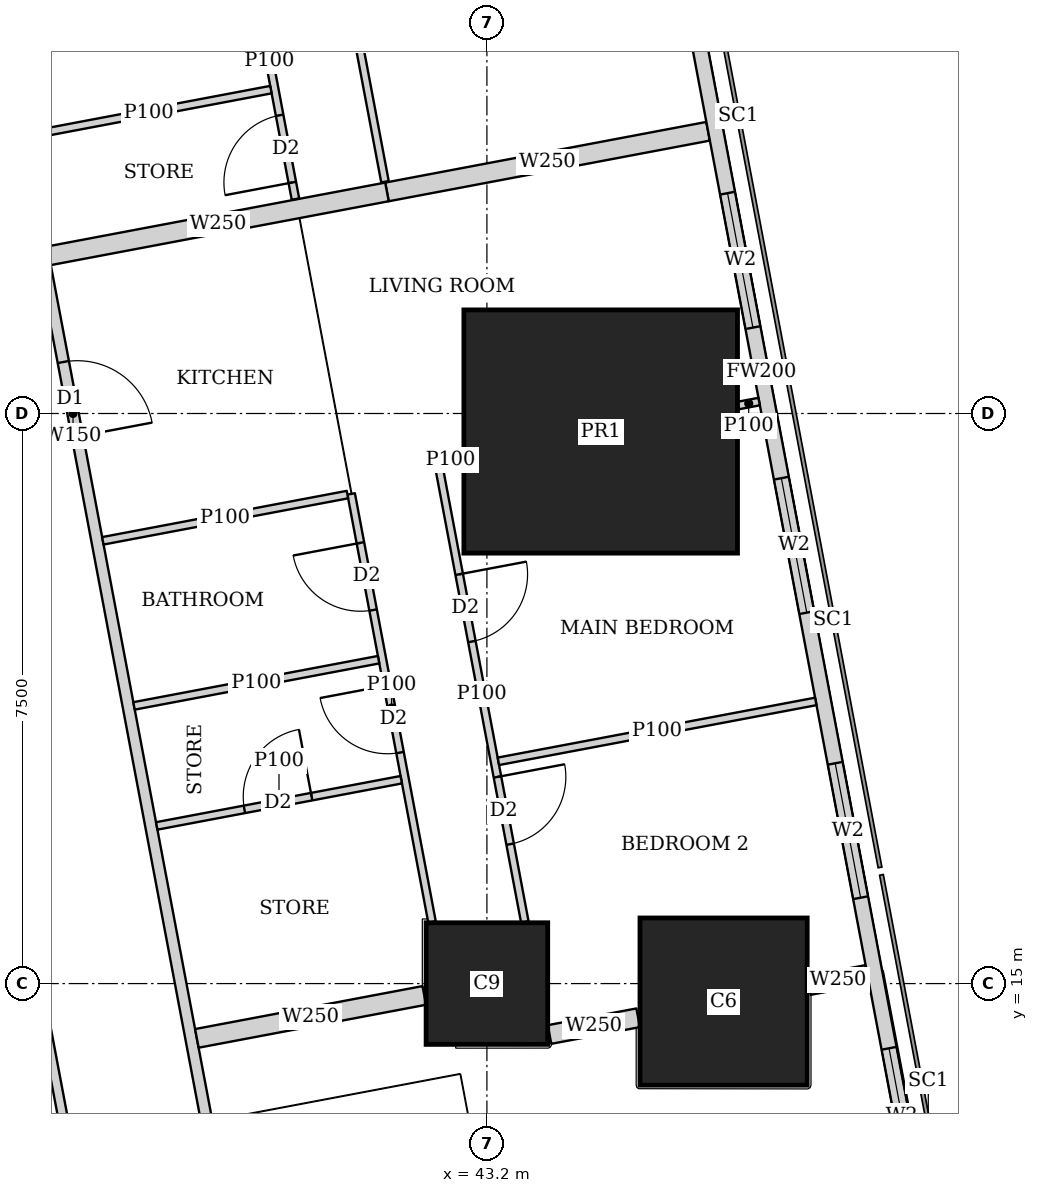
"""IFC4 building model, lengths in metres.
Left out: names, types, materials, properties, quantities, classifications, styles, units other than length and angle.
Written with IfcOpenShell. Run it as: python <this file> out.ifc"""

import sys

from ifc_helpers import new_model, si_unit, direction, frame, frame_2d, origin, origin_2d, place, context, subcontext, project, spatial, rectangle, extrude, element, fill, save


model = new_model("IFC4")
c1 = context("Model", 3, precision=1e-05, world=origin(), true_north=direction((0.0, 1.0)))
c2 = subcontext(c1, "Body", "Model", "MODEL_VIEW")
j1 = project(units=[si_unit("LENGTHUNIT", "METRE"), si_unit("PLANEANGLEUNIT", "RADIAN")], contexts=[c1])
p1 = place(None, origin())
s1 = spatial("IfcSite", under=j1, at=p1, CompositionType="ELEMENT")
p2 = place(p1, origin())
s2 = spatial("IfcBuilding", under=s1, at=p2, CompositionType="ELEMENT")
p3 = place(p2, frame((0.0, 0.0, 122.9)))
s3 = spatial("IfcBuildingStorey", under=s2, at=p3, CompositionType="ELEMENT", Elevation=122.9)
p4 = place(p3, frame((43.2, 15.0, 0.0), z_axis=(0.0, 0.0, 1.0), x_axis=(1.0, 0.0, 0.0)))
e1 = element("IfcColumn", 1, at=p4, inside=s3, PredefinedType="COLUMN", context=c2, shape_type="SweptSolid", body=[
    extrude(rectangle(XDim=1.6, YDim=1.6, at=origin_2d()), origin(), (0.0, 0.0, 1.0), 3.75),
])
p5 = place(p3, frame((46.314, 14.763, 0.0), z_axis=(0.0, 0.0, 1.0), x_axis=(1.0, 0.0, 0.0)))
e2 = element("IfcColumn", 2, at=p5, inside=s3, PredefinedType="COLUMN", context=c2, shape_type="SweptSolid", body=[
    extrude(rectangle(XDim=2.2, YDim=2.2, at=origin_2d()), origin(), (0.0, 0.0, 1.0), 3.75),
])
p6 = place(p3, frame((44.697, 22.263, 0.0), z_axis=(0.0, 0.0, 1.0), x_axis=(1.0, 0.0, 0.0)))
e3 = element("IfcColumn", 3, at=p6, inside=s3, PredefinedType="COLUMN", context=c2, shape_type="SweptSolid", body=[
    extrude(rectangle(XDim=3.6, YDim=3.2, at=origin_2d()), origin(), (0.0, 0.0, 1.0), 3.75),
])
p7 = place(p3, frame((50.653, 2.703, 0.0), z_axis=(0.0, 0.0, 1.0), x_axis=(-0.185612026696, 0.982623109613, 0.0)))
e4 = element("IfcWall", 4, at=p7, inside=s3, PredefinedType="SOLIDWALL", context=c2, shape_type="SweptSolid", body=[
    extrude(rectangle(XDim=41.393, YDim=0.2, at=frame_2d((20.697, 0.0))), origin(), (0.0, 0.0, 1.0), 3.5),
])
p8 = place(p7, frame((1.633, 0.0, 0.9)))
e5 = element("IfcOpeningElement", 5, at=p8, cuts=e4, PredefinedType="OPENING", context=c2, shape_type="SweptSolid", body=[
    extrude(rectangle(XDim=1.8, YDim=1.5, at=frame_2d((0.9, 0.75))), frame((0.0, 0.11, 0.0), z_axis=(0.0, -1.0, 0.0), x_axis=(1.0, 0.0, 0.0)), (0.0, 0.0, 1.0), 0.22),
])
p9 = place(p7, frame((6.032, 0.0, 0.9)))
e6 = element("IfcOpeningElement", 6, at=p9, cuts=e4, PredefinedType="OPENING", context=c2, shape_type="SweptSolid", body=[
    extrude(rectangle(XDim=1.8, YDim=1.5, at=frame_2d((0.9, 0.75))), frame((0.0, 0.11, 0.0), z_axis=(0.0, -1.0, 0.0), x_axis=(1.0, 0.0, 0.0)), (0.0, 0.0, 1.0), 0.22),
])
p10 = place(p7, frame((9.848, 0.0, 0.9)))
e7 = element("IfcOpeningElement", 7, at=p10, cuts=e4, PredefinedType="OPENING", context=c2, shape_type="SweptSolid", body=[
    extrude(rectangle(XDim=1.8, YDim=1.5, at=frame_2d((0.9, 0.75))), frame((0.0, 0.11, 0.0), z_axis=(0.0, -1.0, 0.0), x_axis=(1.0, 0.0, 0.0)), (0.0, 0.0, 1.0), 0.22),
])
p11 = place(p7, frame((13.664, 0.0, 0.9)))
e8 = element("IfcOpeningElement", 8, at=p11, cuts=e4, PredefinedType="OPENING", context=c2, shape_type="SweptSolid", body=[
    extrude(rectangle(XDim=1.8, YDim=1.5, at=frame_2d((0.9, 0.75))), frame((0.0, 0.11, 0.0), z_axis=(0.0, -1.0, 0.0), x_axis=(1.0, 0.0, 0.0)), (0.0, 0.0, 1.0), 0.22),
])
p12 = place(p7, frame((17.481, 0.0, 0.9)))
e9 = element("IfcOpeningElement", 9, at=p12, cuts=e4, PredefinedType="OPENING", context=c2, shape_type="SweptSolid", body=[
    extrude(rectangle(XDim=1.8, YDim=1.5, at=frame_2d((0.9, 0.75))), frame((0.0, 0.11, 0.0), z_axis=(0.0, -1.0, 0.0), x_axis=(1.0, 0.0, 0.0)), (0.0, 0.0, 1.0), 0.22),
])
p13 = place(p7, frame((21.297, 0.0, 0.9)))
e10 = element("IfcOpeningElement", 10, at=p13, cuts=e4, PredefinedType="OPENING", context=c2, shape_type="SweptSolid", body=[
    extrude(rectangle(XDim=1.8, YDim=1.5, at=frame_2d((0.9, 0.75))), frame((0.0, 0.11, 0.0), z_axis=(0.0, -1.0, 0.0), x_axis=(1.0, 0.0, 0.0)), (0.0, 0.0, 1.0), 0.22),
])
p14 = place(p7, frame((25.113, 0.0, 0.9)))
e11 = element("IfcOpeningElement", 11, at=p14, cuts=e4, PredefinedType="OPENING", context=c2, shape_type="SweptSolid", body=[
    extrude(rectangle(XDim=1.8, YDim=1.5, at=frame_2d((0.9, 0.75))), frame((0.0, 0.11, 0.0), z_axis=(0.0, -1.0, 0.0), x_axis=(1.0, 0.0, 0.0)), (0.0, 0.0, 1.0), 0.22),
])
p15 = place(p7, frame((28.93, 0.0, 0.9)))
e12 = element("IfcOpeningElement", 12, at=p15, cuts=e4, PredefinedType="OPENING", context=c2, shape_type="SweptSolid", body=[
    extrude(rectangle(XDim=1.8, YDim=1.5, at=frame_2d((0.9, 0.75))), frame((0.0, 0.11, 0.0), z_axis=(0.0, -1.0, 0.0), x_axis=(1.0, 0.0, 0.0)), (0.0, 0.0, 1.0), 0.22),
])
p16 = place(p7, frame((32.746, 0.0, 0.9)))
e13 = element("IfcOpeningElement", 13, at=p16, cuts=e4, PredefinedType="OPENING", context=c2, shape_type="SweptSolid", body=[
    extrude(rectangle(XDim=1.8, YDim=1.5, at=frame_2d((0.9, 0.75))), frame((0.0, 0.11, 0.0), z_axis=(0.0, -1.0, 0.0), x_axis=(1.0, 0.0, 0.0)), (0.0, 0.0, 1.0), 0.22),
])
p17 = place(p7, frame((36.481, 0.0, 0.9)))
e14 = element("IfcOpeningElement", 14, at=p17, cuts=e4, PredefinedType="OPENING", context=c2, shape_type="SweptSolid", body=[
    extrude(rectangle(XDim=1.8, YDim=1.5, at=frame_2d((0.9, 0.75))), frame((0.0, 0.11, 0.0), z_axis=(0.0, -1.0, 0.0), x_axis=(1.0, 0.0, 0.0)), (0.0, 0.0, 1.0), 0.22),
])
p18 = place(p3, frame((33.382, 45.65, 0.0), z_axis=(0.0, 0.0, 1.0), x_axis=(0.185593544777, -0.982626600565, 0.0)))
e15 = element("IfcWall", 15, at=p18, inside=s3, PredefinedType="SOLIDWALL", context=c2, shape_type="SweptSolid", body=[
    extrude(rectangle(XDim=47.118, YDim=0.15, at=frame_2d((23.559, 0.0))), origin(), (0.0, 0.0, 1.0), 2.2),
])
p19 = place(p18, frame((10.662, 0.0, 0.0)))
e16 = element("IfcOpeningElement", 16, at=p19, cuts=e15, PredefinedType="OPENING", context=c2, shape_type="SweptSolid", body=[
    extrude(rectangle(XDim=1.0, YDim=2.1, at=frame_2d((0.5, 1.05))), frame((0.0, 0.085, 0.0), z_axis=(0.0, -1.0, 0.0), x_axis=(1.0, 0.0, 0.0)), (0.0, 0.0, 1.0), 0.17),
])
p20 = place(p18, frame((15.237, 0.0, 0.0)))
e17 = element("IfcOpeningElement", 17, at=p20, cuts=e15, PredefinedType="OPENING", context=c2, shape_type="SweptSolid", body=[
    extrude(rectangle(XDim=1.0, YDim=2.1, at=frame_2d((0.5, 1.05))), frame((0.0, 0.085, 0.0), z_axis=(0.0, -1.0, 0.0), x_axis=(1.0, 0.0, 0.0)), (0.0, 0.0, 1.0), 0.17),
])
p21 = place(p18, frame((22.87, 0.0, 0.0)))
e18 = element("IfcOpeningElement", 18, at=p21, cuts=e15, PredefinedType="OPENING", context=c2, shape_type="SweptSolid", body=[
    extrude(rectangle(XDim=1.0, YDim=2.1, at=frame_2d((0.5, 1.05))), frame((0.0, 0.085, 0.0), z_axis=(0.0, -1.0, 0.0), x_axis=(1.0, 0.0, 0.0)), (0.0, 0.0, 1.0), 0.17),
])
p22 = place(p18, frame((33.833, 0.0, 0.0)))
e19 = element("IfcOpeningElement", 19, at=p22, cuts=e15, PredefinedType="OPENING", context=c2, shape_type="SweptSolid", body=[
    extrude(rectangle(XDim=1.0, YDim=2.1, at=frame_2d((0.5, 1.05))), frame((0.0, 0.085, 0.0), z_axis=(0.0, -1.0, 0.0), x_axis=(1.0, 0.0, 0.0)), (0.0, 0.0, 1.0), 0.17),
])
p23 = place(p3, frame((41.156, 29.273, 0.0), z_axis=(0.0, 0.0, 1.0), x_axis=(0.185474762472, -0.982649028131, 0.0)))
e20 = element("IfcWall", 20, at=p23, inside=s3, PredefinedType="PARTITIONING", context=c2, shape_type="SweptSolid", body=[
    extrude(rectangle(XDim=3.79, YDim=0.1, at=frame_2d((1.895, 0.0))), origin(), (0.0, 0.0, 1.0), 2.5),
])
p24 = place(p23, frame((0.9, 0.0, 0.0)))
e21 = element("IfcOpeningElement", 21, at=p24, cuts=e20, PredefinedType="OPENING", context=c2, shape_type="SweptSolid", body=[
    extrude(rectangle(XDim=0.9, YDim=2.1, at=frame_2d((0.45, 1.05))), frame((0.0, 0.06, 0.0), z_axis=(0.0, -1.0, 0.0), x_axis=(1.0, 0.0, 0.0)), (0.0, 0.0, 1.0), 0.12),
])
p25 = place(p3, frame((39.997, 28.942, 0.0), z_axis=(0.0, 0.0, 1.0), x_axis=(0.185580474845, -0.982629069057, 0.0)))
e22 = element("IfcWall", 22, at=p25, inside=s3, PredefinedType="PARTITIONING", context=c2, shape_type="SweptSolid", body=[
    extrude(rectangle(XDim=3.685, YDim=0.1, at=frame_2d((1.842, 0.0))), origin(), (0.0, 0.0, 1.0), 3.5),
])
p26 = place(p25, frame((0.655, 0.0, 0.0)))
e23 = element("IfcOpeningElement", 23, at=p26, cuts=e22, PredefinedType="OPENING", context=c2, shape_type="SweptSolid", body=[
    extrude(rectangle(XDim=0.9, YDim=2.1, at=frame_2d((0.45, 1.05))), frame((0.0, 0.06, 0.0), z_axis=(0.0, -1.0, 0.0), x_axis=(1.0, 0.0, 0.0)), (0.0, 0.0, 1.0), 0.12),
])
p27 = place(p25, frame((2.563, 0.0, 0.0)))
e24 = element("IfcOpeningElement", 24, at=p27, cuts=e22, PredefinedType="OPENING", context=c2, shape_type="SweptSolid", body=[
    extrude(rectangle(XDim=0.9, YDim=2.1, at=frame_2d((0.45, 1.05))), frame((0.0, 0.06, 0.0), z_axis=(0.0, -1.0, 0.0), x_axis=(1.0, 0.0, 0.0)), (0.0, 0.0, 1.0), 0.12),
])
p28 = place(p3, frame((40.358, 26.761, 0.0), z_axis=(0.0, 0.0, 1.0), x_axis=(-0.982607776398, -0.185693181787, 0.0)))
e25 = element("IfcWall", 25, at=p28, inside=s3, PredefinedType="PARTITIONING", context=c2, shape_type="SweptSolid", body=[
    extrude(rectangle(XDim=3.274, YDim=0.1, at=frame_2d((1.637, 0.0))), origin(), (0.0, 0.0, 1.0), 3.5),
])
p29 = place(p3, frame((42.566, 21.809, 0.0), z_axis=(0.0, 0.0, 1.0), x_axis=(0.18559218796, -0.982626856832, 0.0)))
e26 = element("IfcWall", 26, at=p29, inside=s3, PredefinedType="PARTITIONING", context=c2, shape_type="SweptSolid", body=[
    extrude(rectangle(XDim=6.105, YDim=0.1, at=frame_2d((3.052, 0.0))), origin(), (0.0, 0.0, 1.0), 2.5),
])
p30 = place(p29, frame((1.45, 0.0, 0.0)))
e27 = element("IfcOpeningElement", 27, at=p30, cuts=e26, PredefinedType="OPENING", context=c2, shape_type="SweptSolid", body=[
    extrude(rectangle(XDim=0.9, YDim=2.1, at=frame_2d((0.45, 1.05))), frame((0.0, 0.06, 0.0), z_axis=(0.0, -1.0, 0.0), x_axis=(1.0, 0.0, 0.0)), (0.0, 0.0, 1.0), 0.12),
])
p31 = place(p29, frame((4.163, 0.0, 0.0)))
e28 = element("IfcOpeningElement", 28, at=p31, cuts=e26, PredefinedType="OPENING", context=c2, shape_type="SweptSolid", body=[
    extrude(rectangle(XDim=0.9, YDim=2.1, at=frame_2d((0.45, 1.05))), frame((0.0, 0.06, 0.0), z_axis=(0.0, -1.0, 0.0), x_axis=(1.0, 0.0, 0.0)), (0.0, 0.0, 1.0), 0.12),
])
p32 = place(p3, frame((41.414, 21.442, 0.0), z_axis=(0.0, 0.0, 1.0), x_axis=(0.185636022079, -0.982618576716, 0.0)))
e29 = element("IfcWall", 29, at=p32, inside=s3, PredefinedType="PARTITIONING", context=c2, shape_type="SweptSolid", body=[
    extrude(rectangle(XDim=5.731, YDim=0.1, at=frame_2d((2.866, 0.0))), origin(), (0.0, 0.0, 1.0), 3.5),
])
p33 = place(p32, frame((0.655, 0.0, 0.0)))
e30 = element("IfcOpeningElement", 30, at=p33, cuts=e29, PredefinedType="OPENING", context=c2, shape_type="SweptSolid", body=[
    extrude(rectangle(XDim=0.9, YDim=2.1, at=frame_2d((0.45, 1.05))), frame((0.0, 0.06, 0.0), z_axis=(0.0, -1.0, 0.0), x_axis=(1.0, 0.0, 0.0)), (0.0, 0.0, 1.0), 0.12),
])
p34 = place(p32, frame((2.563, 0.0, 0.0)))
e31 = element("IfcOpeningElement", 31, at=p34, cuts=e29, PredefinedType="OPENING", context=c2, shape_type="SweptSolid", body=[
    extrude(rectangle(XDim=0.9, YDim=2.1, at=frame_2d((0.45, 1.05))), frame((0.0, 0.06, 0.0), z_axis=(0.0, -1.0, 0.0), x_axis=(1.0, 0.0, 0.0)), (0.0, 0.0, 1.0), 0.12),
])
p35 = place(p3, frame((46.782, 22.657, 0.0), z_axis=(0.0, 0.0, 1.0), x_axis=(-0.982574553168, -0.185868898601, 0.0)))
e32 = element("IfcWall", 32, at=p35, inside=s3, PredefinedType="PARTITIONING", context=c2, shape_type="SweptSolid", body=[
    extrude(rectangle(XDim=0.28, YDim=0.1, at=frame_2d((0.14, 0.0))), origin(), (0.0, 0.0, 1.0), 3.5),
])
p36 = place(p3, frame((42.887, 21.921, 0.0), z_axis=(0.0, 0.0, 1.0), x_axis=(-0.982274918032, -0.187445953293, 0.0)))
e33 = element("IfcWall", 33, at=p36, inside=s3, PredefinedType="PARTITIONING", context=c2, shape_type="SweptSolid", body=[
    extrude(rectangle(XDim=0.336, YDim=0.1, at=frame_2d((0.168, 0.0))), origin(), (0.0, 0.0, 1.0), 2.5),
])
p37 = place(p3, frame((47.527, 18.712, 0.0), z_axis=(0.0, 0.0, 1.0), x_axis=(-0.982665405803, -0.185387972203, 0.0)))
e34 = element("IfcWall", 34, at=p37, inside=s3, PredefinedType="PARTITIONING", context=c2, shape_type="SweptSolid", body=[
    extrude(rectangle(XDim=4.25, YDim=0.1, at=frame_2d((2.125, 0.0))), origin(), (0.0, 0.0, 1.0), 2.2),
])
p38 = place(p3, frame((41.365, 21.433, 0.0), z_axis=(0.0, 0.0, 1.0), x_axis=(-0.982607026909, -0.185697147715, 0.0)))
e35 = element("IfcWall", 35, at=p38, inside=s3, PredefinedType="PARTITIONING", context=c2, shape_type="SweptSolid", body=[
    extrude(rectangle(XDim=3.275, YDim=0.1, at=frame_2d((1.637, 0.0))), origin(), (0.0, 0.0, 1.0), 3.5),
])
p39 = place(p3, frame((42.073, 17.682, 0.0), z_axis=(0.0, 0.0, 1.0), x_axis=(-0.982610347627, -0.185679575441, 0.0)))
e36 = element("IfcWall", 36, at=p39, inside=s3, PredefinedType="PARTITIONING", context=c2, shape_type="SweptSolid", body=[
    extrude(rectangle(XDim=3.274, YDim=0.1, at=frame_2d((1.637, 0.0))), origin(), (0.0, 0.0, 1.0), 3.5),
])
p40 = place(p39, frame((1.2, 0.0, 0.0)))
e37 = element("IfcOpeningElement", 37, at=p40, cuts=e36, PredefinedType="OPENING", context=c2, shape_type="SweptSolid", body=[
    extrude(rectangle(XDim=0.9, YDim=2.1, at=frame_2d((0.45, 1.05))), frame((0.0, 0.06, 0.0), z_axis=(0.0, -1.0, 0.0), x_axis=(1.0, 0.0, 0.0)), (0.0, 0.0, 1.0), 0.12),
])
p41 = place(p3, frame((41.775, 19.261, 0.0), z_axis=(0.0, 0.0, 1.0), x_axis=(-0.982620626894, -0.185625169636, 0.0)))
e38 = element("IfcWall", 38, at=p41, inside=s3, PredefinedType="PARTITIONING", context=c2, shape_type="SweptSolid", body=[
    extrude(rectangle(XDim=3.275, YDim=0.1, at=frame_2d((1.637, 0.0))), origin(), (0.0, 0.0, 1.0), 3.5),
])
p42 = place(p3, frame((46.11, 26.213, 0.0), z_axis=(0.0, 0.0, 1.0), x_axis=(-0.982633535512, -0.185556823879, 0.0)))
e39 = element("IfcWall", 39, at=p42, inside=s3, PredefinedType="SOLIDWALL", context=c2, shape_type="SweptSolid", body=[
    extrude(rectangle(XDim=4.3, YDim=0.25, at=frame_2d((2.15, 0.0))), origin(), (0.0, 0.0, 1.0), 2.2),
])
p43 = place(p3, frame((41.885, 25.415, 0.0), z_axis=(0.0, 0.0, 1.0), x_axis=(-0.982612837616, -0.185666398014, 0.0)))
e40 = element("IfcWall", 40, at=p43, inside=s3, PredefinedType="SOLIDWALL", context=c2, shape_type="SweptSolid", body=[
    extrude(rectangle(XDim=4.525, YDim=0.25, at=frame_2d((2.262, 0.0))), origin(), (0.0, 0.0, 1.0), 3.5),
])
p44 = place(p3, frame((48.206, 15.12, 0.0), z_axis=(0.0, 0.0, 1.0), x_axis=(-0.982638023929, -0.185533053469, 0.0)))
e41 = element("IfcWall", 41, at=p44, inside=s3, PredefinedType="SOLIDWALL", context=c2, shape_type="SweptSolid", body=[
    extrude(rectangle(XDim=0.782, YDim=0.25, at=frame_2d((0.391, 0.0))), origin(), (0.0, 0.0, 1.0), 3.5),
])
p45 = place(p3, frame((45.19, 14.55, 0.0), z_axis=(0.0, 0.0, 1.0), x_axis=(-0.982666604435, -0.185381618634, 0.0)))
e42 = element("IfcWall", 42, at=p45, inside=s3, PredefinedType="SOLIDWALL", context=c2, shape_type="SweptSolid", body=[
    extrude(rectangle(XDim=1.187, YDim=0.25, at=frame_2d((0.593, 0.0))), origin(), (0.0, 0.0, 1.0), 3.5),
])
p46 = place(p3, frame((42.376, 14.844, 0.0), z_axis=(0.0, 0.0, 1.0), x_axis=(-0.982636286056, -0.185542257522, 0.0)))
e43 = element("IfcWall", 43, at=p46, inside=s3, PredefinedType="SOLIDWALL", context=c2, shape_type="SweptSolid", body=[
    extrude(rectangle(XDim=3.045, YDim=0.25, at=frame_2d((1.522, 0.0))), origin(), (0.0, 0.0, 1.0), 3.5),
])
p47 = place(p3, frame((38.202, 10.163, 0.0), z_axis=(0.0, 0.0, 1.0), x_axis=(-0.185610321132, 0.982623431783, 0.0)))
e44 = element("IfcWall", 44, at=p47, inside=s3, PredefinedType="PARTITIONING", context=c2, shape_type="SweptSolid", body=[
    extrude(rectangle(XDim=25.111, YDim=0.125, at=frame_2d((12.556, 0.0))), origin(), (0.0, 0.0, 1.0), 2.5),
])
p48 = place(p47, frame((0.708, 0.0, 0.0)))
e45 = element("IfcOpeningElement", 45, at=p48, cuts=e44, PredefinedType="OPENING", context=c2, shape_type="SweptSolid", body=[
    extrude(rectangle(XDim=1.0, YDim=2.1, at=frame_2d((0.5, 1.05))), frame((0.0, 0.073, 0.0), z_axis=(0.0, -1.0, 0.0), x_axis=(1.0, 0.0, 0.0)), (0.0, 0.0, 1.0), 0.145),
])
p49 = place(p47, frame((13.378, 0.0, 0.0)))
e46 = element("IfcOpeningElement", 46, at=p49, cuts=e44, PredefinedType="OPENING", context=c2, shape_type="SweptSolid", body=[
    extrude(rectangle(XDim=1.0, YDim=2.1, at=frame_2d((0.5, 1.05))), frame((0.0, 0.073, 0.0), z_axis=(0.0, -1.0, 0.0), x_axis=(1.0, 0.0, 0.0)), (0.0, 0.0, 1.0), 0.145),
])
p50 = place(p47, frame((21.25, 0.0, 0.0)))
e47 = element("IfcOpeningElement", 47, at=p50, cuts=e44, PredefinedType="OPENING", context=c2, shape_type="SweptSolid", body=[
    extrude(rectangle(XDim=1.0, YDim=2.1, at=frame_2d((0.5, 1.05))), frame((0.0, 0.073, 0.0), z_axis=(0.0, -1.0, 0.0), x_axis=(1.0, 0.0, 0.0)), (0.0, 0.0, 1.0), 0.145),
])
p51 = place(p47, frame((23.453, 0.0, 0.0)))
e48 = element("IfcOpeningElement", 48, at=p51, cuts=e44, PredefinedType="OPENING", context=c2, shape_type="SweptSolid", body=[
    extrude(rectangle(XDim=1.0, YDim=2.1, at=frame_2d((0.5, 1.05))), frame((0.0, 0.073, 0.0), z_axis=(0.0, -1.0, 0.0), x_axis=(1.0, 0.0, 0.0)), (0.0, 0.0, 1.0), 0.145),
])
p52 = place(p10, origin())
e49 = element("IfcWindow", 49, at=p52, inside=s3, PartitioningType="SINGLE_PANEL", PredefinedType="WINDOW", context=c2, shape_type="SweptSolid", body=[
    extrude(rectangle(XDim=1.8, YDim=1.5, at=frame_2d((0.9, 0.75))), frame((0.0, 0.03, 0.0), z_axis=(0.0, -1.0, 0.0), x_axis=(1.0, 0.0, 0.0)), (0.0, 0.0, 1.0), 0.06),
])
fill(e7, e49)
p53 = place(p11, origin())
e50 = element("IfcWindow", 50, at=p53, inside=s3, PartitioningType="SINGLE_PANEL", PredefinedType="WINDOW", context=c2, shape_type="SweptSolid", body=[
    extrude(rectangle(XDim=1.8, YDim=1.5, at=frame_2d((0.9, 0.75))), frame((0.0, 0.03, 0.0), z_axis=(0.0, -1.0, 0.0), x_axis=(1.0, 0.0, 0.0)), (0.0, 0.0, 1.0), 0.06),
])
fill(e8, e50)
p54 = place(p12, origin())
e51 = element("IfcWindow", 51, at=p54, inside=s3, PartitioningType="SINGLE_PANEL", PredefinedType="WINDOW", context=c2, shape_type="SweptSolid", body=[
    extrude(rectangle(XDim=1.8, YDim=1.5, at=frame_2d((0.9, 0.75))), frame((0.0, 0.03, 0.0), z_axis=(0.0, -1.0, 0.0), x_axis=(1.0, 0.0, 0.0)), (0.0, 0.0, 1.0), 0.06),
])
fill(e9, e51)
p55 = place(p13, origin())
e52 = element("IfcWindow", 52, at=p55, inside=s3, PartitioningType="SINGLE_PANEL", PredefinedType="WINDOW", context=c2, shape_type="SweptSolid", body=[
    extrude(rectangle(XDim=1.8, YDim=1.5, at=frame_2d((0.9, 0.75))), frame((0.0, 0.03, 0.0), z_axis=(0.0, -1.0, 0.0), x_axis=(1.0, 0.0, 0.0)), (0.0, 0.0, 1.0), 0.06),
])
fill(e10, e52)
p56 = place(p27, origin())
e53 = element("IfcDoor", 53, at=p56, inside=s3, OperationType="SINGLE_SWING_LEFT", PredefinedType="DOOR", context=c2, shape_type="SweptSolid", body=[
    extrude(rectangle(XDim=0.9, YDim=2.1, at=frame_2d((0.45, 1.05))), frame((0.0, 0.025, 0.0), z_axis=(0.0, -1.0, 0.0), x_axis=(1.0, 0.0, 0.0)), (0.0, 0.0, 1.0), 0.05),
])
fill(e24, e53)
p57 = place(p30, origin())
e54 = element("IfcDoor", 54, at=p57, inside=s3, OperationType="SINGLE_SWING_LEFT", PredefinedType="DOOR", context=c2, shape_type="SweptSolid", body=[
    extrude(rectangle(XDim=0.9, YDim=2.1, at=frame_2d((0.45, 1.05))), frame((0.0, 0.025, 0.0), z_axis=(0.0, -1.0, 0.0), x_axis=(1.0, 0.0, 0.0)), (0.0, 0.0, 1.0), 0.05),
])
fill(e27, e54)
p58 = place(p31, origin())
e55 = element("IfcDoor", 55, at=p58, inside=s3, OperationType="SINGLE_SWING_LEFT", PredefinedType="DOOR", context=c2, shape_type="SweptSolid", body=[
    extrude(rectangle(XDim=0.9, YDim=2.1, at=frame_2d((0.45, 1.05))), frame((0.0, 0.025, 0.0), z_axis=(0.0, -1.0, 0.0), x_axis=(1.0, 0.0, 0.0)), (0.0, 0.0, 1.0), 0.05),
])
fill(e28, e55)
p59 = place(p33, origin())
e56 = element("IfcDoor", 56, at=p59, inside=s3, OperationType="SINGLE_SWING_RIGHT", PredefinedType="DOOR", context=c2, shape_type="SweptSolid", body=[
    extrude(rectangle(XDim=0.9, YDim=2.1, at=frame_2d((0.45, 1.05))), frame((0.0, 0.025, 0.0), z_axis=(0.0, -1.0, 0.0), x_axis=(1.0, 0.0, 0.0)), (0.0, 0.0, 1.0), 0.05),
])
fill(e30, e56)
p60 = place(p34, origin())
e57 = element("IfcDoor", 57, at=p60, inside=s3, OperationType="SINGLE_SWING_RIGHT", PredefinedType="DOOR", context=c2, shape_type="SweptSolid", body=[
    extrude(rectangle(XDim=0.9, YDim=2.1, at=frame_2d((0.45, 1.05))), frame((0.0, 0.025, 0.0), z_axis=(0.0, -1.0, 0.0), x_axis=(1.0, 0.0, 0.0)), (0.0, 0.0, 1.0), 0.05),
])
fill(e31, e57)
p61 = place(p21, origin())
e58 = element("IfcDoor", 58, at=p61, inside=s3, OperationType="SINGLE_SWING_RIGHT", PredefinedType="DOOR", context=c2, shape_type="SweptSolid", body=[
    extrude(rectangle(XDim=1.0, YDim=2.1, at=frame_2d((0.5, 1.05))), frame((0.0, 0.025, 0.0), z_axis=(0.0, -1.0, 0.0), x_axis=(1.0, 0.0, 0.0)), (0.0, 0.0, 1.0), 0.05),
])
fill(e18, e58)
p62 = place(p40, origin())
e59 = element("IfcDoor", 59, at=p62, inside=s3, OperationType="SINGLE_SWING_RIGHT", PredefinedType="DOOR", context=c2, shape_type="SweptSolid", body=[
    extrude(rectangle(XDim=0.9, YDim=2.1, at=frame_2d((0.45, 1.05))), frame((0.0, 0.025, 0.0), z_axis=(0.0, -1.0, 0.0), x_axis=(1.0, 0.0, 0.0)), (0.0, 0.0, 1.0), 0.05),
])
fill(e37, e59)
save(model, sys.argv[1])
